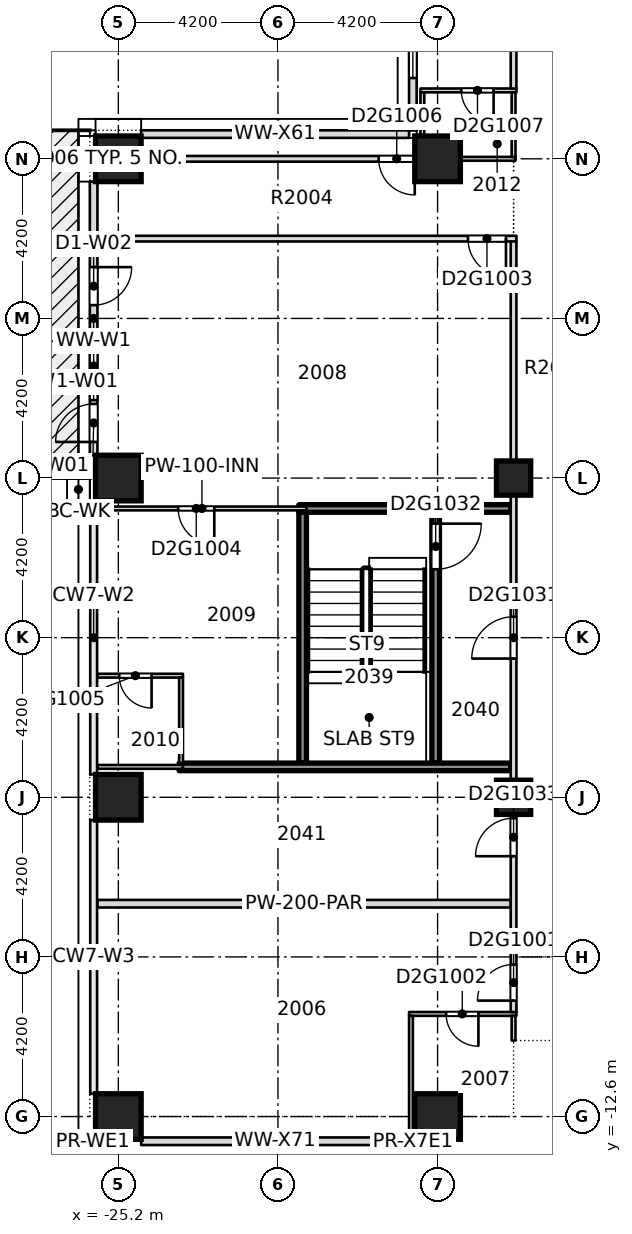
"""IFC4 building model, lengths in metres.
Left out: names, types, materials, properties, quantities, classifications, styles, units other than length and angle.
Written with IfcOpenShell. Run it as: python <this file> out.ifc"""

import sys

from ifc_helpers import new_model, si_unit, direction, frame, frame_2d, origin, origin_2d, place, context, subcontext, project, spatial, rectangle, extrude, element, fill, save


model = new_model("IFC4")
c1 = context("Model", 3, precision=1e-05, world=origin(), true_north=direction((0.0, 1.0)))
c2 = subcontext(c1, "Body", "Model", "MODEL_VIEW")
j1 = project(units=[si_unit("LENGTHUNIT", "METRE"), si_unit("PLANEANGLEUNIT", "RADIAN")], contexts=[c1])
p1 = place(None, origin())
s1 = spatial("IfcSite", under=j1, at=p1, CompositionType="ELEMENT")
p2 = place(p1, origin())
s2 = spatial("IfcBuilding", under=s1, at=p2, CompositionType="ELEMENT")
p3 = place(p2, frame((0.0, 0.0, 83.85)))
s3 = spatial("IfcBuildingStorey", under=s2, at=p3, CompositionType="ELEMENT", Elevation=83.85)
for number, where, z_axis, x_axis in (
    (1, (-25.2, -12.6, -0.32), (0.0, 0.0, 1.0), (1.0, 0.0, 0.0)),
    (2, (-16.8, -12.6, -0.32), (0.0, 0.0, 1.0), (1.0, 0.0, 0.0)),
    (3, (-25.2, -4.2, -0.32), (0.0, 0.0, 1.0), (1.0, 0.0, 0.0)),
    (4, (-25.2, 4.2, -0.32), (0.0, 0.0, 1.0), (1.0, 0.0, 0.0)),
    (5, (-25.2, 12.6, -0.32), (0.0, 0.0, 1.0), (1.0, 0.0, 0.0)),
    (6, (-16.8, 12.6, -0.32), (0.0, 0.0, 1.0), (1.0, 0.0, 0.0)),
):
    element("IfcColumn", number, at=place(p3, frame(where, z_axis=z_axis, x_axis=x_axis)), inside=s3, PredefinedType="COLUMN", context=c2, shape_type="SweptSolid", body=[
        extrude(rectangle(XDim=1.2, YDim=1.2, at=origin_2d()), origin(), (0.0, 0.0, 1.0), 3.45),
    ])
for number, where, z_axis, x_axis in (
    (7, (-14.8, -4.2, -0.32), (0.0, 0.0, 1.0), (1.0, 0.0, 0.0)),
    (8, (-14.8, 4.2, -0.32), (0.0, 0.0, 1.0), (1.0, 0.0, 0.0)),
):
    element("IfcColumn", number, at=place(p3, frame(where, z_axis=z_axis, x_axis=x_axis)), inside=s3, PredefinedType="COLUMN", context=c2, shape_type="SweptSolid", body=[
        extrude(rectangle(XDim=0.9, YDim=0.9, at=origin_2d()), origin(), (0.0, 0.0, 1.0), 3.45),
    ])
p4 = place(p3, frame((-17.55, -9.9, 0.0), z_axis=(0.0, 0.0, 1.0), x_axis=(1.0, 0.0, 0.0)))
e9 = element("IfcWall", 9, at=p4, inside=s3, PredefinedType="PARTITIONING", context=c2, shape_type="SweptSolid", body=[
    extrude(rectangle(XDim=2.825, YDim=0.1, at=frame_2d((1.413, 0.0))), origin(), (0.0, 0.0, 1.0), 3.13),
])
p5 = place(p4, frame((0.975, 0.0, 0.0)))
e10 = element("IfcOpeningElement", 10, at=p5, cuts=e9, PredefinedType="OPENING", context=c2, shape_type="SweptSolid", body=[
    extrude(rectangle(XDim=0.85, YDim=2.1, at=frame_2d((0.425, 1.05))), frame((0.0, 0.06, 0.0), z_axis=(0.0, -1.0, 0.0), x_axis=(1.0, 0.0, 0.0)), (0.0, 0.0, 1.0), 0.12),
])
p6 = place(p3, frame((-25.75, -7.0, 0.0), z_axis=(0.0, 0.0, 1.0), x_axis=(1.0, 0.0, 0.0)))
e11 = element("IfcWall", 11, at=p6, inside=s3, PredefinedType="PARTITIONING", context=c2, shape_type="SweptSolid", body=[
    extrude(rectangle(XDim=10.875, YDim=0.2, at=frame_2d((5.438, 0.0))), origin(), (0.0, 0.0, 1.0), 3.13),
])
p7 = place(p3, frame((-25.75, -3.4, 0.0), z_axis=(0.0, 0.0, 1.0), x_axis=(1.0, 0.0, 0.0)))
e12 = element("IfcWall", 12, at=p7, inside=s3, PredefinedType="PARTITIONING", context=c2, shape_type="SweptSolid", body=[
    extrude(rectangle(XDim=2.25, YDim=0.1, at=frame_2d((1.125, 0.0))), origin(), (0.0, 0.0, 1.0), 3.13),
])
p8 = place(p3, frame((-25.75, -1.0, 0.0), z_axis=(0.0, 0.0, 1.0), x_axis=(1.0, 0.0, 0.0)))
e13 = element("IfcWall", 13, at=p8, inside=s3, PredefinedType="PARTITIONING", context=c2, shape_type="SweptSolid", body=[
    extrude(rectangle(XDim=2.25, YDim=0.1, at=frame_2d((1.125, 0.0))), origin(), (0.0, 0.0, 1.0), 3.13),
])
p9 = place(p8, frame((0.575, 0.0, 0.0)))
e14 = element("IfcOpeningElement", 14, at=p9, cuts=e13, PredefinedType="OPENING", context=c2, shape_type="SweptSolid", body=[
    extrude(rectangle(XDim=0.85, YDim=2.1, at=frame_2d((0.425, 1.05))), frame((0.0, 0.06, 0.0), z_axis=(0.0, -1.0, 0.0), x_axis=(1.0, 0.0, 0.0)), (0.0, 0.0, 1.0), 0.12),
])
p10 = place(p3, frame((-25.75, 3.4, 0.0), z_axis=(0.0, 0.0, 1.0), x_axis=(1.0, 0.0, 0.0)))
e15 = element("IfcWall", 15, at=p10, inside=s3, PredefinedType="PARTITIONING", context=c2, shape_type="SweptSolid", body=[
    extrude(rectangle(XDim=5.5, YDim=0.1, at=frame_2d((2.75, 0.0))), origin(), (0.0, 0.0, 1.0), 3.13),
])
p11 = place(p10, frame((2.125, 0.0, 0.0)))
e16 = element("IfcOpeningElement", 16, at=p11, cuts=e15, PredefinedType="OPENING", context=c2, shape_type="SweptSolid", body=[
    extrude(rectangle(XDim=0.95, YDim=2.1, at=frame_2d((0.475, 1.05))), frame((0.0, 0.06, 0.0), z_axis=(0.0, -1.0, 0.0), x_axis=(1.0, 0.0, 0.0)), (0.0, 0.0, 1.0), 0.12),
])
p12 = place(p3, frame((-20.45, 3.4, 0.0), z_axis=(0.0, 0.0, 1.0), x_axis=(1.0, 0.0, 0.0)))
e17 = element("IfcWall", 17, at=p12, inside=s3, PredefinedType="SOLIDWALL", context=c2, shape_type="SweptSolid", body=[
    extrude(rectangle(XDim=5.575, YDim=0.2, at=frame_2d((2.788, 0.0))), origin(), (0.0, 0.0, 1.0), 3.13),
])
p13 = place(p3, frame((-25.75, 10.5, 0.0), z_axis=(0.0, 0.0, 1.0), x_axis=(1.0, 0.0, 0.0)))
e18 = element("IfcWall", 18, at=p13, inside=s3, PredefinedType="PARTITIONING", context=c2, shape_type="SweptSolid", body=[
    extrude(rectangle(XDim=11.025, YDim=0.15, at=frame_2d((5.512, 0.0))), origin(), (0.0, 0.0, 1.0), 3.13),
])
p14 = place(p13, frame((9.75, 0.0, 0.0)))
e19 = element("IfcOpeningElement", 19, at=p14, cuts=e18, PredefinedType="OPENING", context=c2, shape_type="SweptSolid", body=[
    extrude(rectangle(XDim=1.0, YDim=2.1, at=frame_2d((0.5, 1.05))), frame((0.0, 0.085, 0.0), z_axis=(0.0, -1.0, 0.0), x_axis=(1.0, 0.0, 0.0)), (0.0, 0.0, 1.0), 0.17),
])
p15 = place(p3, frame((-25.75, 12.6, 0.0), z_axis=(0.0, 0.0, 1.0), x_axis=(1.0, 0.0, 0.0)))
e20 = element("IfcWall", 20, at=p15, inside=s3, PredefinedType="PARTITIONING", context=c2, shape_type="SweptSolid", body=[
    extrude(rectangle(XDim=1.15, YDim=0.15, at=frame_2d((0.575, 0.0))), origin(), (0.0, 0.0, 1.0), 3.13),
])
p16 = place(p3, frame((-17.25, 12.6, 0.0), z_axis=(0.0, 0.0, 1.0), x_axis=(1.0, 0.0, 0.0)))
e21 = element("IfcWall", 21, at=p16, inside=s3, PredefinedType="PARTITIONING", context=c2, shape_type="SweptSolid", body=[
    extrude(rectangle(XDim=2.5, YDim=0.1, at=frame_2d((1.25, 0.0))), origin(), (0.0, 0.0, 1.0), 3.13),
])
p17 = place(p3, frame((-17.25, 14.4, 0.0), z_axis=(0.0, 0.0, 1.0), x_axis=(1.0, 0.0, 0.0)))
e22 = element("IfcWall", 22, at=p17, inside=s3, PredefinedType="PARTITIONING", context=c2, shape_type="SweptSolid", body=[
    extrude(rectangle(XDim=2.525, YDim=0.1, at=frame_2d((1.262, 0.0))), origin(), (0.0, 0.0, 1.0), 3.13),
])
p18 = place(p17, frame((1.075, 0.0, 0.0)))
e23 = element("IfcOpeningElement", 23, at=p18, cuts=e22, PredefinedType="OPENING", context=c2, shape_type="SweptSolid", body=[
    extrude(rectangle(XDim=0.85, YDim=2.1, at=frame_2d((0.425, 1.05))), frame((0.0, 0.06, 0.0), z_axis=(0.0, -1.0, 0.0), x_axis=(1.0, 0.0, 0.0)), (0.0, 0.0, 1.0), 0.12),
])
p19 = place(p3, frame((-23.55, -3.3, 0.0), z_axis=(0.0, 0.0, 1.0), x_axis=(0.0, 1.0, 0.0)))
e24 = element("IfcWall", 24, at=p19, inside=s3, PredefinedType="PARTITIONING", context=c2, shape_type="SweptSolid", body=[
    extrude(rectangle(XDim=2.25, YDim=0.1, at=frame_2d((1.125, 0.0))), origin(), (0.0, 0.0, 1.0), 3.13),
])
p20 = place(p3, frame((-20.35, -3.3, 0.0), z_axis=(0.0, 0.0, 1.0), x_axis=(0.0, 1.0, 0.0)))
e25 = element("IfcWall", 25, at=p20, inside=s3, PredefinedType="SOLIDWALL", context=c2, shape_type="SweptSolid", body=[
    extrude(rectangle(XDim=6.6, YDim=0.2, at=frame_2d((3.3, 0.0))), origin(), (0.0, 0.0, 1.0), 3.13),
])
p21 = place(p3, frame((-17.5, -13.35, 0.0), z_axis=(0.0, 0.0, 1.0), x_axis=(0.0, 1.0, 0.0)))
e26 = element("IfcWall", 26, at=p21, inside=s3, PredefinedType="PARTITIONING", context=c2, shape_type="SweptSolid", body=[
    extrude(rectangle(XDim=3.4, YDim=0.1, at=frame_2d((1.7, 0.0))), origin(), (0.0, 0.0, 1.0), 3.13),
])
p22 = place(p3, frame((-17.2, 12.675, 0.0), z_axis=(0.0, 0.0, 1.0), x_axis=(0.0, 1.0, 0.0)))
e27 = element("IfcWall", 27, at=p22, inside=s3, PredefinedType="PARTITIONING", context=c2, shape_type="SweptSolid", body=[
    extrude(rectangle(XDim=1.675, YDim=0.1, at=frame_2d((0.837, 0.0))), origin(), (0.0, 0.0, 1.0), 3.13),
])
p23 = place(p3, frame((-16.85, -3.3, 0.0), z_axis=(0.0, 0.0, 1.0), x_axis=(0.0, 1.0, 0.0)))
e28 = element("IfcWall", 28, at=p23, inside=s3, PredefinedType="SOLIDWALL", context=c2, shape_type="SweptSolid", body=[
    extrude(rectangle(XDim=6.6, YDim=0.2, at=frame_2d((3.3, 0.0))), origin(), (0.0, 0.0, 1.0), 3.13),
])
p24 = place(p23, frame((5.1, 0.0, 0.0)))
e29 = element("IfcOpeningElement", 29, at=p24, cuts=e28, PredefinedType="OPENING", context=c2, shape_type="SweptSolid", body=[
    extrude(rectangle(XDim=1.2, YDim=2.1, at=frame_2d((0.6, 1.05))), frame((0.0, 0.11, 0.0), z_axis=(0.0, -1.0, 0.0), x_axis=(1.0, 0.0, 0.0)), (0.0, 0.0, 1.0), 0.22),
])
p25 = place(p3, frame((-14.8, -10.6, 0.0), z_axis=(0.0, 0.0, 1.0), x_axis=(0.0, 1.0, 0.0)))
e30 = element("IfcWall", 30, at=p25, inside=s3, PredefinedType="PARTITIONING", context=c2, shape_type="SweptSolid", body=[
    extrude(rectangle(XDim=0.65, YDim=0.1, at=frame_2d((0.325, 0.0))), origin(), (0.0, 0.0, 1.0), 3.13),
])
p26 = place(p3, frame((-14.8, -9.85, 0.0), z_axis=(0.0, 0.0, 1.0), x_axis=(0.0, 1.0, 0.0)))
e31 = element("IfcWall", 31, at=p26, inside=s3, PredefinedType="PARTITIONING", context=c2, shape_type="SweptSolid", body=[
    extrude(rectangle(XDim=20.275, YDim=0.15, at=frame_2d((10.138, 0.0))), origin(), (0.0, 0.0, 1.0), 3.13),
])
p27 = place(p26, frame((0.3, 0.0, 0.0)))
e32 = element("IfcOpeningElement", 32, at=p27, cuts=e31, PredefinedType="OPENING", context=c2, shape_type="SweptSolid", body=[
    extrude(rectangle(XDim=0.95, YDim=2.1, at=frame_2d((0.475, 1.05))), frame((0.0, 0.085, 0.0), z_axis=(0.0, -1.0, 0.0), x_axis=(1.0, 0.0, 0.0)), (0.0, 0.0, 1.0), 0.17),
])
p28 = place(p26, frame((9.3, 0.0, 0.0)))
e33 = element("IfcOpeningElement", 33, at=p28, cuts=e31, PredefinedType="OPENING", context=c2, shape_type="SweptSolid", body=[
    extrude(rectangle(XDim=1.1, YDim=2.1, at=frame_2d((0.55, 1.05))), frame((0.0, 0.085, 0.0), z_axis=(0.0, -1.0, 0.0), x_axis=(1.0, 0.0, 0.0)), (0.0, 0.0, 1.0), 0.17),
])
p29 = place(p26, frame((4.1, 0.0, 0.0)))
e34 = element("IfcOpeningElement", 34, at=p29, cuts=e31, PredefinedType="OPENING", context=c2, shape_type="SweptSolid", body=[
    extrude(rectangle(XDim=1.0, YDim=2.1, at=frame_2d((0.5, 1.05))), frame((0.0, 0.085, 0.0), z_axis=(0.0, -1.0, 0.0), x_axis=(1.0, 0.0, 0.0)), (0.0, 0.0, 1.0), 0.17),
])
p30 = place(p3, frame((-14.8, 12.65, 0.0), z_axis=(0.0, 0.0, 1.0), x_axis=(0.0, 1.0, 0.0)))
e35 = element("IfcWall", 35, at=p30, inside=s3, PredefinedType="PARTITIONING", context=c2, shape_type="SweptSolid", body=[
    extrude(rectangle(XDim=1.7, YDim=0.1, at=frame_2d((0.85, 0.0))), origin(), (0.0, 0.0, 1.0), 3.13),
])
p31 = place(p3, frame((-14.8, 14.45, 0.0), z_axis=(0.0, 0.0, 1.0), x_axis=(0.0, 1.0, 0.0)))
e36 = element("IfcWall", 36, at=p31, inside=s3, PredefinedType="PARTITIONING", context=c2, shape_type="SweptSolid", body=[
    extrude(rectangle(XDim=7.1, YDim=0.15, at=frame_2d((3.55, 0.0))), origin(), (0.0, 0.0, 1.0), 3.13),
])
p32 = place(p31, frame((4.4, 0.0, 0.0)))
e37 = element("IfcOpeningElement", 37, at=p32, cuts=e36, PredefinedType="OPENING", context=c2, shape_type="SweptSolid", body=[
    extrude(rectangle(XDim=0.95, YDim=2.1, at=frame_2d((0.475, 1.05))), frame((0.0, 0.085, 0.0), z_axis=(0.0, -1.0, 0.0), x_axis=(1.0, 0.0, 0.0)), (0.0, 0.0, 1.0), 0.17),
])
p33 = place(p3, frame((-17.45, 20.4, 0.0), z_axis=(0.0, 0.0, 1.0), x_axis=(0.0, -1.0, 0.0)))
e38 = element("IfcWall", 38, at=p33, inside=s3, PredefinedType="STANDARD", context=c2, shape_type="SweptSolid", body=[
    extrude(rectangle(XDim=7.05, YDim=0.2, at=frame_2d((3.525, 0.0))), origin(), (0.0, 0.0, 1.0), 3.13),
])
p34 = place(p33, frame((3.875, 0.0, 0.2)))
e39 = element("IfcOpeningElement", 39, at=p34, cuts=e38, PredefinedType="OPENING", context=c2, shape_type="SweptSolid", body=[
    extrude(rectangle(XDim=1.8, YDim=2.65, at=frame_2d((0.9, 1.325))), frame((0.0, 0.11, 0.0), z_axis=(0.0, -1.0, 0.0), x_axis=(1.0, 0.0, 0.0)), (0.0, 0.0, 1.0), 0.22),
])
p35 = place(p33, frame((0.35, 0.0, 0.2)))
e40 = element("IfcOpeningElement", 40, at=p35, cuts=e38, PredefinedType="OPENING", context=c2, shape_type="SweptSolid", body=[
    extrude(rectangle(XDim=1.8, YDim=2.65, at=frame_2d((0.9, 1.325))), frame((0.0, 0.11, 0.0), z_axis=(0.0, -1.0, 0.0), x_axis=(1.0, 0.0, 0.0)), (0.0, 0.0, 1.0), 0.22),
])
p36 = place(p3, frame((-17.55, 13.25, 0.0), z_axis=(0.0, 0.0, 1.0), x_axis=(-1.0, 0.0, 0.0)))
e41 = element("IfcWall", 41, at=p36, inside=s3, PredefinedType="STANDARD", context=c2, shape_type="SweptSolid", body=[
    extrude(rectangle(XDim=7.05, YDim=0.2, at=frame_2d((3.525, 0.0))), origin(), (0.0, 0.0, 1.0), 3.13),
])
p37 = place(p3, frame((-25.85, 12.0, 0.0), z_axis=(0.0, 0.0, 1.0), x_axis=(0.0, -1.0, 0.0)))
e42 = element("IfcWall", 42, at=p37, inside=s3, PredefinedType="STANDARD", context=c2, shape_type="SweptSolid", body=[
    extrude(rectangle(XDim=7.2, YDim=0.2, at=frame_2d((3.6, 0.0))), origin(), (0.0, 0.0, 1.0), 3.13),
])
p38 = place(p37, frame((3.95, 0.0, 0.2)))
e43 = element("IfcOpeningElement", 43, at=p38, cuts=e42, PredefinedType="OPENING", context=c2, shape_type="SweptSolid", body=[
    extrude(rectangle(XDim=1.8, YDim=2.65, at=frame_2d((0.9, 1.325))), frame((0.0, 0.11, 0.0), z_axis=(0.0, -1.0, 0.0), x_axis=(1.0, 0.0, 0.0)), (0.0, 0.0, 1.0), 0.22),
])
p39 = place(p37, frame((5.85, 0.0, 0.0)))
e44 = element("IfcOpeningElement", 44, at=p39, cuts=e42, PredefinedType="OPENING", context=c2, shape_type="SweptSolid", body=[
    extrude(rectangle(XDim=1.0, YDim=2.4, at=frame_2d((0.5, 1.2))), frame((0.0, 0.11, 0.0), z_axis=(0.0, -1.0, 0.0), x_axis=(1.0, 0.0, 0.0)), (0.0, 0.0, 1.0), 0.22),
])
p40 = place(p37, frame((2.25, 0.0, 0.0)))
e45 = element("IfcOpeningElement", 45, at=p40, cuts=e42, PredefinedType="OPENING", context=c2, shape_type="SweptSolid", body=[
    extrude(rectangle(XDim=1.0, YDim=2.4, at=frame_2d((0.5, 1.2))), frame((0.0, 0.11, 0.0), z_axis=(0.0, -1.0, 0.0), x_axis=(1.0, 0.0, 0.0)), (0.0, 0.0, 1.0), 0.22),
])
p41 = place(p3, frame((-24.6, -13.25, 0.0), z_axis=(0.0, 0.0, 1.0), x_axis=(1.0, 0.0, 0.0)))
e46 = element("IfcWall", 46, at=p41, inside=s3, PredefinedType="STANDARD", context=c2, shape_type="SweptSolid", body=[
    extrude(rectangle(XDim=7.05, YDim=0.2, at=frame_2d((3.525, 0.0))), origin(), (0.0, 0.0, 1.0), 3.13),
])
p42 = place(p3, frame((-17.45, -13.35, 0.0), z_axis=(0.0, 0.0, 1.0), x_axis=(0.0, -1.0, 0.0)))
e47 = element("IfcWall", 47, at=p42, inside=s3, PredefinedType="STANDARD", context=c2, shape_type="SweptSolid", body=[
    extrude(rectangle(XDim=7.05, YDim=0.2, at=frame_2d((3.525, 0.0))), origin(), (0.0, 0.0, 1.0), 3.13),
])
p43 = place(p42, frame((3.8, 0.0, 0.2)))
e48 = element("IfcOpeningElement", 48, at=p43, cuts=e47, PredefinedType="OPENING", context=c2, shape_type="SweptSolid", body=[
    extrude(rectangle(XDim=1.8, YDim=2.65, at=frame_2d((0.9, 1.325))), frame((0.0, 0.11, 0.0), z_axis=(0.0, -1.0, 0.0), x_axis=(1.0, 0.0, 0.0)), (0.0, 0.0, 1.0), 0.22),
])
p44 = place(p42, frame((0.275, 0.0, 0.2)))
e49 = element("IfcOpeningElement", 49, at=p44, cuts=e47, PredefinedType="OPENING", context=c2, shape_type="SweptSolid", body=[
    extrude(rectangle(XDim=1.8, YDim=2.65, at=frame_2d((0.9, 1.325))), frame((0.0, 0.11, 0.0), z_axis=(0.0, -1.0, 0.0), x_axis=(1.0, 0.0, 0.0)), (0.0, 0.0, 1.0), 0.22),
])
p45 = place(p3, frame((-23.6, -3.4, 0.0), z_axis=(0.0, 0.0, 1.0), x_axis=(1.0, 0.0, 0.0)))
e50 = element("IfcWall", 50, at=p45, inside=s3, PredefinedType="SOLIDWALL", context=c2, shape_type="SweptSolid", body=[
    extrude(rectangle(XDim=8.725, YDim=0.2, at=frame_2d((4.363, 0.0))), origin(), (0.0, 0.0, 1.0), 3.13),
])
p46 = place(p3, frame((-24.6, 12.6, 0.0), z_axis=(0.0, 0.0, 1.0), x_axis=(1.0, 0.0, 0.0)))
e51 = element("IfcWall", 51, at=p46, inside=s3, PredefinedType="PARTITIONING", context=c2, shape_type="SweptSolid", body=[
    extrude(rectangle(XDim=7.2, YDim=0.15, at=frame_2d((3.6, 0.0))), origin(), (0.0, 0.0, 1.0), 2.58),
])
p47 = place(p46, frame((6.25, 0.0, 0.0)))
e52 = element("IfcOpeningElement", 52, at=p47, cuts=e51, PredefinedType="OPENING", context=c2, shape_type="SweptSolid", body=[
    extrude(rectangle(XDim=0.95, YDim=2.1, at=frame_2d((0.475, 1.05))), frame((0.0, 0.085, 0.0), z_axis=(0.0, -1.0, 0.0), x_axis=(1.0, 0.0, 0.0)), (0.0, 0.0, 1.0), 0.17),
])
p48 = place(p3, frame((-17.4, 12.6, 0.0), z_axis=(0.0, 0.0, 1.0), x_axis=(1.0, 0.0, 0.0)))
e53 = element("IfcWall", 53, at=p48, inside=s3, PredefinedType="PARTITIONING", context=c2, shape_type="SweptSolid", body=[
    extrude(rectangle(XDim=0.25, YDim=0.15, at=frame_2d((0.125, 0.0))), origin(), (0.0, 0.0, 1.0), 3.13),
])
p49 = place(p27, origin())
e54 = element("IfcDoor", 54, at=p49, inside=s3, OperationType="SINGLE_SWING_LEFT", PredefinedType="DOOR", context=c2, shape_type="SweptSolid", body=[
    extrude(rectangle(XDim=0.95, YDim=2.1, at=frame_2d((0.475, 1.05))), frame((0.0, 0.025, 0.0), z_axis=(0.0, -1.0, 0.0), x_axis=(1.0, 0.0, 0.0)), (0.0, 0.0, 1.0), 0.05),
])
fill(e32, e54)
p50 = place(p5, origin())
e55 = element("IfcDoor", 55, at=p50, inside=s3, OperationType="SINGLE_SWING_RIGHT", PredefinedType="DOOR", context=c2, shape_type="SweptSolid", body=[
    extrude(rectangle(XDim=0.85, YDim=2.1, at=frame_2d((0.425, 1.05))), frame((0.0, 0.025, 0.0), z_axis=(0.0, -1.0, 0.0), x_axis=(1.0, 0.0, 0.0)), (0.0, 0.0, 1.0), 0.05),
])
fill(e10, e55)
p51 = place(p14, origin())
e56 = element("IfcDoor", 56, at=p51, inside=s3, OperationType="SINGLE_SWING_RIGHT", PredefinedType="DOOR", context=c2, shape_type="SweptSolid", body=[
    extrude(rectangle(XDim=1.0, YDim=2.1, at=frame_2d((0.5, 1.05))), frame((0.0, 0.025, 0.0), z_axis=(0.0, -1.0, 0.0), x_axis=(1.0, 0.0, 0.0)), (0.0, 0.0, 1.0), 0.05),
])
fill(e19, e56)
p52 = place(p11, origin())
e57 = element("IfcDoor", 57, at=p52, inside=s3, OperationType="SINGLE_SWING_LEFT", PredefinedType="DOOR", context=c2, shape_type="SweptSolid", body=[
    extrude(rectangle(XDim=0.95, YDim=2.1, at=frame_2d((0.475, 1.05))), frame((0.0, 0.025, 0.0), z_axis=(0.0, -1.0, 0.0), x_axis=(1.0, 0.0, 0.0)), (0.0, 0.0, 1.0), 0.05),
])
fill(e16, e57)
p53 = place(p9, origin())
e58 = element("IfcDoor", 58, at=p53, inside=s3, OperationType="SINGLE_SWING_RIGHT", PredefinedType="DOOR", context=c2, shape_type="SweptSolid", body=[
    extrude(rectangle(XDim=0.85, YDim=2.1, at=frame_2d((0.425, 1.05))), frame((0.0, 0.025, 0.0), z_axis=(0.0, -1.0, 0.0), x_axis=(1.0, 0.0, 0.0)), (0.0, 0.0, 1.0), 0.05),
])
fill(e14, e58)
p54 = place(p47, origin())
e59 = element("IfcDoor", 59, at=p54, inside=s3, OperationType="SINGLE_SWING_LEFT", PredefinedType="DOOR", context=c2, shape_type="SweptSolid", body=[
    extrude(rectangle(XDim=0.95, YDim=2.1, at=frame_2d((0.475, 1.05))), frame((0.0, 0.025, 0.0), z_axis=(0.0, -1.0, 0.0), x_axis=(1.0, 0.0, 0.0)), (0.0, 0.0, 1.0), 0.05),
])
fill(e52, e59)
p55 = place(p18, origin())
e60 = element("IfcDoor", 60, at=p55, inside=s3, OperationType="SINGLE_SWING_RIGHT", PredefinedType="DOOR", context=c2, shape_type="SweptSolid", body=[
    extrude(rectangle(XDim=0.85, YDim=2.1, at=frame_2d((0.425, 1.05))), frame((0.0, 0.025, 0.0), z_axis=(0.0, -1.0, 0.0), x_axis=(1.0, 0.0, 0.0)), (0.0, 0.0, 1.0), 0.05),
])
fill(e23, e60)
p56 = place(p28, origin())
e61 = element("IfcDoor", 61, at=p56, inside=s3, OperationType="SINGLE_SWING_RIGHT", PredefinedType="DOOR", context=c2, shape_type="SweptSolid", body=[
    extrude(rectangle(XDim=1.1, YDim=2.1, at=frame_2d((0.55, 1.05))), frame((0.0, 0.025, 0.0), z_axis=(0.0, -1.0, 0.0), x_axis=(1.0, 0.0, 0.0)), (0.0, 0.0, 1.0), 0.05),
])
fill(e33, e61)
p57 = place(p24, origin())
e62 = element("IfcDoor", 62, at=p57, inside=s3, OperationType="SINGLE_SWING_RIGHT", PredefinedType="DOOR", context=c2, shape_type="SweptSolid", body=[
    extrude(rectangle(XDim=1.2, YDim=2.1, at=frame_2d((0.6, 1.05))), frame((0.0, 0.025, 0.0), z_axis=(0.0, -1.0, 0.0), x_axis=(1.0, 0.0, 0.0)), (0.0, 0.0, 1.0), 0.05),
])
fill(e29, e62)
p58 = place(p29, origin())
e63 = element("IfcDoor", 63, at=p58, inside=s3, OperationType="SINGLE_SWING_LEFT", PredefinedType="DOOR", context=c2, shape_type="SweptSolid", body=[
    extrude(rectangle(XDim=1.0, YDim=2.1, at=frame_2d((0.5, 1.05))), frame((0.0, 0.025, 0.0), z_axis=(0.0, -1.0, 0.0), x_axis=(1.0, 0.0, 0.0)), (0.0, 0.0, 1.0), 0.05),
])
fill(e34, e63)
p59 = place(p34, origin())
e64 = element("IfcWindow", 64, at=p59, inside=s3, PartitioningType="SINGLE_PANEL", PredefinedType="WINDOW", context=c2, shape_type="SweptSolid", body=[
    extrude(rectangle(XDim=1.8, YDim=2.65, at=frame_2d((0.9, 1.325))), frame((0.0, 0.03, 0.0), z_axis=(0.0, -1.0, 0.0), x_axis=(1.0, 0.0, 0.0)), (0.0, 0.0, 1.0), 0.06),
])
fill(e39, e64)
p60 = place(p38, origin())
e65 = element("IfcWindow", 65, at=p60, inside=s3, PartitioningType="SINGLE_PANEL", PredefinedType="WINDOW", context=c2, shape_type="SweptSolid", body=[
    extrude(rectangle(XDim=1.8, YDim=2.65, at=frame_2d((0.9, 1.325))), frame((0.0, 0.03, 0.0), z_axis=(0.0, -1.0, 0.0), x_axis=(1.0, 0.0, 0.0)), (0.0, 0.0, 1.0), 0.06),
])
fill(e43, e65)
p61 = place(p39, origin())
e66 = element("IfcDoor", 66, at=p61, inside=s3, OperationType="SINGLE_SWING_LEFT", PredefinedType="DOOR", context=c2, shape_type="SweptSolid", body=[
    extrude(rectangle(XDim=1.0, YDim=2.4, at=frame_2d((0.5, 1.2))), frame((0.0, 0.025, 0.0), z_axis=(0.0, -1.0, 0.0), x_axis=(1.0, 0.0, 0.0)), (0.0, 0.0, 1.0), 0.05),
])
fill(e44, e66)
p62 = place(p40, origin())
e67 = element("IfcDoor", 67, at=p62, inside=s3, OperationType="SINGLE_SWING_LEFT", PredefinedType="DOOR", context=c2, shape_type="SweptSolid", body=[
    extrude(rectangle(XDim=1.0, YDim=2.4, at=frame_2d((0.5, 1.2))), frame((0.0, 0.025, 0.0), z_axis=(0.0, -1.0, 0.0), x_axis=(1.0, 0.0, 0.0)), (0.0, 0.0, 1.0), 0.05),
])
fill(e45, e67)
save(model, sys.argv[1])
